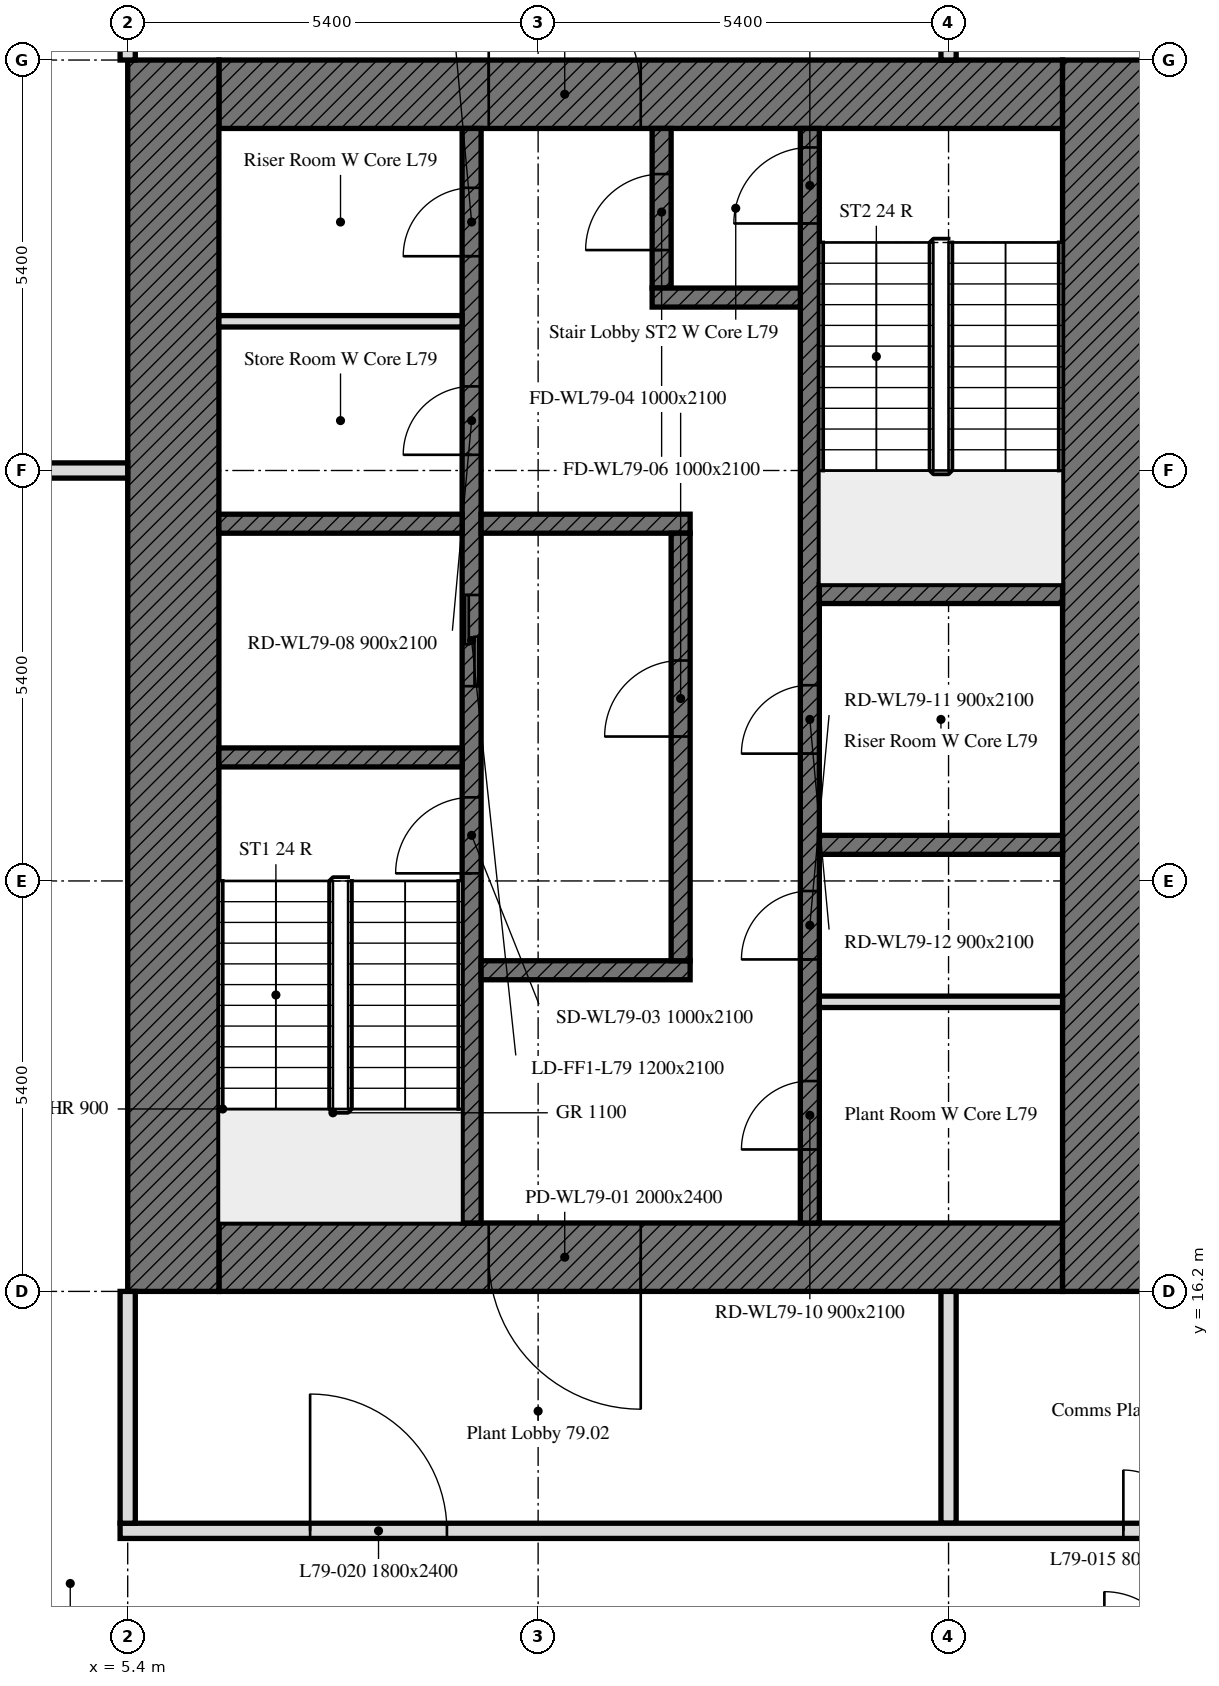
"""IFC4 building model, lengths in metres.
Left out: names, types, materials, properties, quantities, classifications, styles, units other than length and angle.
Written with IfcOpenShell. Run it as: python <this file> out.ifc"""

import sys

from ifc_helpers import new_model, si_unit, direction, frame, frame_2d, origin, place, context, subcontext, project, spatial, rectangle, extrude, element, fill, save


model = new_model("IFC4")
c1 = context("Model", 3, precision=1e-05, world=origin(), true_north=direction((0.0, 1.0)))
c2 = subcontext(c1, "Body", "Model", "MODEL_VIEW")
j1 = project(units=[si_unit("LENGTHUNIT", "METRE"), si_unit("PLANEANGLEUNIT", "RADIAN")], contexts=[c1])
p1 = place(None, origin())
s1 = spatial("IfcSite", under=j1, at=p1, CompositionType="ELEMENT")
p2 = place(p1, origin())
s2 = spatial("IfcBuilding", under=s1, at=p2, CompositionType="ELEMENT")
p3 = place(p2, frame((0.0, 0.0, 317.2)))
s3 = spatial("IfcBuildingStorey", under=s2, at=p3, CompositionType="ELEMENT", Elevation=317.2)
p4 = place(p3, frame((17.7, 16.65, 0.0), z_axis=(0.0, 0.0, 1.0), x_axis=(-1.0, 0.0, 0.0)))
e1 = element("IfcWall", 1, at=p4, inside=s3, PredefinedType="SOLIDWALL", context=c2, shape_type="SweptSolid", body=[
    extrude(rectangle(XDim=11.1, YDim=0.9, at=frame_2d((5.55, 0.0))), origin(), (0.0, 0.0, 1.0), 4.2),
])
p5 = place(p4, frame((5.55, 0.0, 0.0)))
e2 = element("IfcOpeningElement", 2, at=p5, cuts=e1, PredefinedType="OPENING", context=c2, shape_type="SweptSolid", body=[
    extrude(rectangle(XDim=2.0, YDim=2.4, at=frame_2d((1.0, 1.2))), frame((0.0, 0.45, 0.0), z_axis=(0.0, -1.0, 0.0), x_axis=(1.0, 0.0, 0.0)), (0.0, 0.0, 1.0), 0.9),
])
p6 = place(p3, frame((6.6, 31.95, 0.0), z_axis=(0.0, 0.0, 1.0), x_axis=(1.0, 0.0, 0.0)))
e3 = element("IfcWall", 3, at=p6, inside=s3, PredefinedType="SOLIDWALL", context=c2, shape_type="SweptSolid", body=[
    extrude(rectangle(XDim=11.1, YDim=0.9, at=frame_2d((5.55, 0.0))), origin(), (0.0, 0.0, 1.0), 4.2),
])
p7 = place(p6, frame((3.55, 0.0, 0.0)))
e4 = element("IfcOpeningElement", 4, at=p7, cuts=e3, PredefinedType="OPENING", context=c2, shape_type="SweptSolid", body=[
    extrude(rectangle(XDim=2.0, YDim=2.4, at=frame_2d((1.0, 1.2))), frame((0.0, 0.45, 0.0), z_axis=(0.0, -1.0, 0.0), x_axis=(1.0, 0.0, 0.0)), (0.0, 0.0, 1.0), 0.9),
])
for number, where, z_axis, x_axis in (
    (5, (6.0, 16.2, 0.0), (0.0, 0.0, 1.0), (0.0, 1.0, 0.0)),
    (6, (18.3, 32.4, 0.0), (0.0, 0.0, 1.0), (0.0, -1.0, 0.0)),
):
    element("IfcWall", number, at=place(p3, frame(where, z_axis=z_axis, x_axis=x_axis)), inside=s3, PredefinedType="SOLIDWALL", context=c2, shape_type="SweptSolid", body=[
        extrude(rectangle(XDim=16.2, YDim=1.2, at=frame_2d((8.1, 0.0))), origin(), (0.0, 0.0, 1.0), 4.2),
    ])
p8 = place(p3, frame((9.925, 17.1, 0.0), z_axis=(0.0, 0.0, 1.0), x_axis=(0.0, 1.0, 0.0)))
e7 = element("IfcWall", 7, at=p8, inside=s3, PredefinedType="SOLIDWALL", context=c2, shape_type="SweptSolid", body=[
    extrude(rectangle(XDim=14.4, YDim=0.25, at=frame_2d((7.2, 0.0))), origin(), (0.0, 0.0, 1.0), 4.2),
])
p9 = place(p8, frame((4.6, 0.0, 0.0)))
e8 = element("IfcOpeningElement", 8, at=p9, cuts=e7, PredefinedType="OPENING", context=c2, shape_type="SweptSolid", body=[
    extrude(rectangle(XDim=1.0, YDim=2.1, at=frame_2d((0.5, 1.05))), frame((0.0, 0.125, 0.0), z_axis=(0.0, -1.0, 0.0), x_axis=(1.0, 0.0, 0.0)), (0.0, 0.0, 1.0), 0.25),
])
p10 = place(p8, frame((7.062, 0.0, 0.0)))
e9 = element("IfcOpeningElement", 9, at=p10, cuts=e7, PredefinedType="OPENING", context=c2, shape_type="SweptSolid", body=[
    extrude(rectangle(XDim=1.2, YDim=2.1, at=frame_2d((0.6, 1.05))), frame((0.0, 0.125, 0.0), z_axis=(0.0, -1.0, 0.0), x_axis=(1.0, 0.0, 0.0)), (0.0, 0.0, 1.0), 0.25),
])
p11 = place(p8, frame((10.106, 0.0, 0.0)))
e10 = element("IfcOpeningElement", 10, at=p11, cuts=e7, PredefinedType="OPENING", context=c2, shape_type="SweptSolid", body=[
    extrude(rectangle(XDim=0.9, YDim=2.1, at=frame_2d((0.45, 1.05))), frame((0.0, 0.125, 0.0), z_axis=(0.0, -1.0, 0.0), x_axis=(1.0, 0.0, 0.0)), (0.0, 0.0, 1.0), 0.25),
])
p12 = place(p8, frame((12.719, 0.0, 0.0)))
e11 = element("IfcOpeningElement", 11, at=p12, cuts=e7, PredefinedType="OPENING", context=c2, shape_type="SweptSolid", body=[
    extrude(rectangle(XDim=0.9, YDim=2.1, at=frame_2d((0.45, 1.05))), frame((0.0, 0.125, 0.0), z_axis=(0.0, -1.0, 0.0), x_axis=(1.0, 0.0, 0.0)), (0.0, 0.0, 1.0), 0.25),
])
p13 = place(p3, frame((14.375, 17.1, 0.0), z_axis=(0.0, 0.0, 1.0), x_axis=(0.0, 1.0, 0.0)))
e12 = element("IfcWall", 12, at=p13, inside=s3, PredefinedType="SOLIDWALL", context=c2, shape_type="SweptSolid", body=[
    extrude(rectangle(XDim=14.4, YDim=0.25, at=frame_2d((7.2, 0.0))), origin(), (0.0, 0.0, 1.0), 4.2),
])
p14 = place(p13, frame((13.15, 0.0, 0.0)))
e13 = element("IfcOpeningElement", 13, at=p14, cuts=e12, PredefinedType="OPENING", context=c2, shape_type="SweptSolid", body=[
    extrude(rectangle(XDim=1.0, YDim=2.1, at=frame_2d((0.5, 1.05))), frame((0.0, 0.125, 0.0), z_axis=(0.0, -1.0, 0.0), x_axis=(1.0, 0.0, 0.0)), (0.0, 0.0, 1.0), 0.25),
])
p15 = place(p13, frame((0.968, 0.0, 0.0)))
e14 = element("IfcOpeningElement", 14, at=p15, cuts=e12, PredefinedType="OPENING", context=c2, shape_type="SweptSolid", body=[
    extrude(rectangle(XDim=0.9, YDim=2.1, at=frame_2d((0.45, 1.05))), frame((0.0, 0.125, 0.0), z_axis=(0.0, -1.0, 0.0), x_axis=(1.0, 0.0, 0.0)), (0.0, 0.0, 1.0), 0.25),
])
p16 = place(p13, frame((3.468, 0.0, 0.0)))
e15 = element("IfcOpeningElement", 15, at=p16, cuts=e12, PredefinedType="OPENING", context=c2, shape_type="SweptSolid", body=[
    extrude(rectangle(XDim=0.9, YDim=2.1, at=frame_2d((0.45, 1.05))), frame((0.0, 0.125, 0.0), z_axis=(0.0, -1.0, 0.0), x_axis=(1.0, 0.0, 0.0)), (0.0, 0.0, 1.0), 0.25),
])
p17 = place(p13, frame((6.175, 0.0, 0.0)))
e16 = element("IfcOpeningElement", 16, at=p17, cuts=e12, PredefinedType="OPENING", context=c2, shape_type="SweptSolid", body=[
    extrude(rectangle(XDim=0.9, YDim=2.1, at=frame_2d((0.45, 1.05))), frame((0.0, 0.125, 0.0), z_axis=(0.0, -1.0, 0.0), x_axis=(1.0, 0.0, 0.0)), (0.0, 0.0, 1.0), 0.25),
])
for number, where, z_axis, x_axis in (
    (17, (6.6, 23.225, 0.0), (0.0, 0.0, 1.0), (1.0, 0.0, 0.0)),
    (18, (14.5, 25.375, 0.0), (0.0, 0.0, 1.0), (1.0, 0.0, 0.0)),
    (19, (14.5, 22.075, 0.0), (0.0, 0.0, 1.0), (1.0, 0.0, 0.0)),
    (20, (6.6, 26.3, 0.0), (0.0, 0.0, 1.0), (1.0, 0.0, 0.0)),
):
    element("IfcWall", number, at=place(p3, frame(where, z_axis=z_axis, x_axis=x_axis)), inside=s3, PredefinedType="SOLIDWALL", context=c2, shape_type="SweptSolid", body=[
        extrude(rectangle(XDim=3.2, YDim=0.25, at=frame_2d((1.6, 0.0))), origin(), (0.0, 0.0, 1.0), 4.2),
    ])
for number, where, z_axis, x_axis in (
    (21, (10.05, 26.3, 0.0), (0.0, 0.0, 1.0), (1.0, 0.0, 0.0)),
    (22, (10.05, 20.425, 0.0), (0.0, 0.0, 1.0), (1.0, 0.0, 0.0)),
):
    element("IfcWall", number, at=place(p3, frame(where, z_axis=z_axis, x_axis=x_axis)), inside=s3, PredefinedType="SOLIDWALL", context=c2, shape_type="SweptSolid", body=[
        extrude(rectangle(XDim=2.75, YDim=0.25, at=frame_2d((1.375, 0.0))), origin(), (0.0, 0.0, 1.0), 4.2),
    ])
p18 = place(p3, frame((12.425, 29.4, 0.0), z_axis=(0.0, 0.0, 1.0), x_axis=(0.0, 1.0, 0.0)))
e23 = element("IfcWall", 23, at=p18, inside=s3, PredefinedType="SOLIDWALL", context=c2, shape_type="SweptSolid", body=[
    extrude(rectangle(XDim=2.1, YDim=0.25, at=frame_2d((1.05, 0.0))), origin(), (0.0, 0.0, 1.0), 4.2),
])
p19 = place(p18, frame((0.5, 0.0, 0.0)))
e24 = element("IfcOpeningElement", 24, at=p19, cuts=e23, PredefinedType="OPENING", context=c2, shape_type="SweptSolid", body=[
    extrude(rectangle(XDim=1.0, YDim=2.1, at=frame_2d((0.5, 1.05))), frame((0.0, 0.125, 0.0), z_axis=(0.0, -1.0, 0.0), x_axis=(1.0, 0.0, 0.0)), (0.0, 0.0, 1.0), 0.25),
])
p20 = place(p3, frame((12.3, 29.275, 0.0), z_axis=(0.0, 0.0, 1.0), x_axis=(1.0, 0.0, 0.0)))
e25 = element("IfcWall", 25, at=p20, inside=s3, PredefinedType="SOLIDWALL", context=c2, shape_type="SweptSolid", body=[
    extrude(rectangle(XDim=1.95, YDim=0.25, at=frame_2d((0.975, 0.0))), origin(), (0.0, 0.0, 1.0), 4.2),
])
p21 = place(p3, frame((12.675, 20.55, 0.0), z_axis=(0.0, 0.0, 1.0), x_axis=(0.0, 1.0, 0.0)))
e26 = element("IfcWall", 26, at=p21, inside=s3, PredefinedType="SOLIDWALL", context=c2, shape_type="SweptSolid", body=[
    extrude(rectangle(XDim=5.625, YDim=0.25, at=frame_2d((2.812, 0.0))), origin(), (0.0, 0.0, 1.0), 4.2),
])
p22 = place(p21, frame((2.95, 0.0, 0.0)))
e27 = element("IfcOpeningElement", 27, at=p22, cuts=e26, PredefinedType="OPENING", context=c2, shape_type="SweptSolid", body=[
    extrude(rectangle(XDim=1.0, YDim=2.1, at=frame_2d((0.5, 1.05))), frame((0.0, 0.125, 0.0), z_axis=(0.0, -1.0, 0.0), x_axis=(1.0, 0.0, 0.0)), (0.0, 0.0, 1.0), 0.25),
])
for number, where, z_axis, x_axis in (
    (28, (6.6, 28.963, 0.0), (0.0, 0.0, 1.0), (1.0, 0.0, 0.0)),
    (29, (14.5, 20.01, 0.0), (0.0, 0.0, 1.0), (1.0, 0.0, 0.0)),
):
    element("IfcWall", number, at=place(p3, frame(where, z_axis=z_axis, x_axis=x_axis)), inside=s3, PredefinedType="PARTITIONING", context=c2, shape_type="SweptSolid", body=[
        extrude(rectangle(XDim=3.2, YDim=0.15, at=frame_2d((1.6, 0.0))), origin(), (0.0, 0.0, 1.0), 4.2),
    ])
p23 = place(p3, frame((16.2, 37.505, 0.0), z_axis=(0.0, 0.0, 1.0), x_axis=(0.0, -1.0, 0.0)))
e30 = element("IfcWall", 30, at=p23, inside=s3, PredefinedType="PARTITIONING", context=c2, shape_type="SweptSolid", body=[
    extrude(rectangle(XDim=5.105, YDim=0.2, at=frame_2d((2.552, 0.0))), origin(), (0.0, 0.0, 1.0), 3.45),
])
p24 = place(p3, frame((5.4, 37.505, 0.0), z_axis=(0.0, 0.0, 1.0), x_axis=(0.0, -1.0, 0.0)))
e31 = element("IfcWall", 31, at=p24, inside=s3, PredefinedType="PARTITIONING", context=c2, shape_type="SweptSolid", body=[
    extrude(rectangle(XDim=5.105, YDim=0.2, at=frame_2d((2.552, 0.0))), origin(), (0.0, 0.0, 1.0), 4.2),
])
p25 = place(p3, frame((3.7, 27.0, 0.0), z_axis=(0.0, 0.0, 1.0), x_axis=(1.0, 0.0, 0.0)))
e32 = element("IfcWall", 32, at=p25, inside=s3, PredefinedType="PARTITIONING", context=c2, shape_type="SweptSolid", body=[
    extrude(rectangle(XDim=1.7, YDim=0.2, at=frame_2d((0.85, 0.0))), origin(), (0.0, 0.0, 1.0), 3.45),
])
p26 = place(p3, frame((16.2, 16.2, 0.0), z_axis=(0.0, 0.0, 1.0), x_axis=(0.0, -1.0, 0.0)))
e33 = element("IfcWall", 33, at=p26, inside=s3, PredefinedType="PARTITIONING", context=c2, shape_type="SweptSolid", body=[
    extrude(rectangle(XDim=3.05, YDim=0.2, at=frame_2d((1.525, 0.0))), origin(), (0.0, 0.0, 1.0), 4.2),
])
p27 = place(p3, frame((5.3, 13.05, 0.0), z_axis=(0.0, 0.0, 1.0), x_axis=(1.0, 0.0, 0.0)))
e34 = element("IfcWall", 34, at=p27, inside=s3, PredefinedType="PARTITIONING", context=c2, shape_type="SweptSolid", body=[
    extrude(rectangle(XDim=36.049, YDim=0.2, at=frame_2d((18.024, 0.0))), origin(), (0.0, 0.0, 1.0), 4.2),
])
p28 = place(p27, frame((23.9, 0.0, 0.0)))
e35 = element("IfcOpeningElement", 35, at=p28, cuts=e34, PredefinedType="OPENING", context=c2, shape_type="SweptSolid", body=[
    extrude(rectangle(XDim=1.0, YDim=2.1, at=frame_2d((0.5, 1.05))), frame((0.0, 0.1, 0.0), z_axis=(0.0, -1.0, 0.0), x_axis=(1.0, 0.0, 0.0)), (0.0, 0.0, 1.0), 0.2),
])
p29 = place(p27, frame((18.5, 0.0, 0.0)))
e36 = element("IfcOpeningElement", 36, at=p29, cuts=e34, PredefinedType="OPENING", context=c2, shape_type="SweptSolid", body=[
    extrude(rectangle(XDim=1.0, YDim=2.1, at=frame_2d((0.5, 1.05))), frame((0.0, 0.1, 0.0), z_axis=(0.0, -1.0, 0.0), x_axis=(1.0, 0.0, 0.0)), (0.0, 0.0, 1.0), 0.2),
])
p30 = place(p27, frame((13.2, 0.0, 0.0)))
e37 = element("IfcOpeningElement", 37, at=p30, cuts=e34, PredefinedType="OPENING", context=c2, shape_type="SweptSolid", body=[
    extrude(rectangle(XDim=0.8, YDim=2.1, at=frame_2d((0.4, 1.05))), frame((0.0, 0.1, 0.0), z_axis=(0.0, -1.0, 0.0), x_axis=(1.0, 0.0, 0.0)), (0.0, 0.0, 1.0), 0.2),
])
p31 = place(p27, frame((29.5, 0.0, 0.0)))
e38 = element("IfcOpeningElement", 38, at=p31, cuts=e34, PredefinedType="OPENING", context=c2, shape_type="SweptSolid", body=[
    extrude(rectangle(XDim=1.8, YDim=2.4, at=frame_2d((0.9, 1.2))), frame((0.0, 0.1, 0.0), z_axis=(0.0, -1.0, 0.0), x_axis=(1.0, 0.0, 0.0)), (0.0, 0.0, 1.0), 0.2),
])
p32 = place(p27, frame((2.5, 0.0, 0.0)))
e39 = element("IfcOpeningElement", 39, at=p32, cuts=e34, PredefinedType="OPENING", context=c2, shape_type="SweptSolid", body=[
    extrude(rectangle(XDim=1.8, YDim=2.4, at=frame_2d((0.9, 1.2))), frame((0.0, 0.1, 0.0), z_axis=(0.0, -1.0, 0.0), x_axis=(1.0, 0.0, 0.0)), (0.0, 0.0, 1.0), 0.2),
])
p33 = place(p3, frame((5.4, 16.2, 0.0), z_axis=(0.0, 0.0, 1.0), x_axis=(0.0, -1.0, 0.0)))
e40 = element("IfcWall", 40, at=p33, inside=s3, PredefinedType="PARTITIONING", context=c2, shape_type="SweptSolid", body=[
    extrude(rectangle(XDim=3.05, YDim=0.2, at=frame_2d((1.525, 0.0))), origin(), (0.0, 0.0, 1.0), 4.2),
])
p34 = place(p5, origin())
e41 = element("IfcDoor", 41, at=p34, inside=s3, OperationType="DOUBLE_DOOR_SINGLE_SWING", PredefinedType="DOOR", context=c2, shape_type="SweptSolid", body=[
    extrude(rectangle(XDim=2.0, YDim=2.4, at=frame_2d((1.0, 1.2))), frame((0.0, 0.025, 0.0), z_axis=(0.0, -1.0, 0.0), x_axis=(1.0, 0.0, 0.0)), (0.0, 0.0, 1.0), 0.05),
])
fill(e2, e41)
p35 = place(p7, origin())
e42 = element("IfcDoor", 42, at=p35, inside=s3, OperationType="DOUBLE_DOOR_SINGLE_SWING", PredefinedType="DOOR", context=c2, shape_type="SweptSolid", body=[
    extrude(rectangle(XDim=2.0, YDim=2.4, at=frame_2d((1.0, 1.2))), frame((0.0, 0.025, 0.0), z_axis=(0.0, -1.0, 0.0), x_axis=(1.0, 0.0, 0.0)), (0.0, 0.0, 1.0), 0.05),
])
fill(e4, e42)
p36 = place(p9, origin())
e43 = element("IfcDoor", 43, at=p36, inside=s3, OperationType="SINGLE_SWING_LEFT", PredefinedType="DOOR", context=c2, shape_type="SweptSolid", body=[
    extrude(rectangle(XDim=1.0, YDim=2.1, at=frame_2d((0.5, 1.05))), frame((0.0, 0.025, 0.0), z_axis=(0.0, -1.0, 0.0), x_axis=(1.0, 0.0, 0.0)), (0.0, 0.0, 1.0), 0.05),
])
fill(e8, e43)
p37 = place(p22, origin())
e44 = element("IfcDoor", 44, at=p37, inside=s3, OperationType="SINGLE_SWING_LEFT", PredefinedType="DOOR", context=c2, shape_type="SweptSolid", body=[
    extrude(rectangle(XDim=1.0, YDim=2.1, at=frame_2d((0.5, 1.05))), frame((0.0, 0.025, 0.0), z_axis=(0.0, -1.0, 0.0), x_axis=(1.0, 0.0, 0.0)), (0.0, 0.0, 1.0), 0.05),
])
fill(e27, e44)
p38 = place(p14, origin())
e45 = element("IfcDoor", 45, at=p38, inside=s3, OperationType="SINGLE_SWING_LEFT", PredefinedType="DOOR", context=c2, shape_type="SweptSolid", body=[
    extrude(rectangle(XDim=1.0, YDim=2.1, at=frame_2d((0.5, 1.05))), frame((0.0, 0.025, 0.0), z_axis=(0.0, -1.0, 0.0), x_axis=(1.0, 0.0, 0.0)), (0.0, 0.0, 1.0), 0.05),
])
fill(e13, e45)
p39 = place(p19, origin())
e46 = element("IfcDoor", 46, at=p39, inside=s3, OperationType="SINGLE_SWING_LEFT", PredefinedType="DOOR", context=c2, shape_type="SweptSolid", body=[
    extrude(rectangle(XDim=1.0, YDim=2.1, at=frame_2d((0.5, 1.05))), frame((0.0, 0.025, 0.0), z_axis=(0.0, -1.0, 0.0), x_axis=(1.0, 0.0, 0.0)), (0.0, 0.0, 1.0), 0.05),
])
fill(e24, e46)
p40 = place(p10, origin())
e47 = element("IfcDoor", 47, at=p40, inside=s3, OperationType="DOUBLE_DOOR_SLIDING", PredefinedType="DOOR", context=c2, shape_type="SweptSolid", body=[
    extrude(rectangle(XDim=1.2, YDim=2.1, at=frame_2d((0.6, 1.05))), frame((0.0, 0.025, 0.0), z_axis=(0.0, -1.0, 0.0), x_axis=(1.0, 0.0, 0.0)), (0.0, 0.0, 1.0), 0.05),
])
fill(e9, e47)
p41 = place(p11, origin())
e48 = element("IfcDoor", 48, at=p41, inside=s3, OperationType="SINGLE_SWING_LEFT", PredefinedType="DOOR", context=c2, shape_type="SweptSolid", body=[
    extrude(rectangle(XDim=0.9, YDim=2.1, at=frame_2d((0.45, 1.05))), frame((0.0, 0.025, 0.0), z_axis=(0.0, -1.0, 0.0), x_axis=(1.0, 0.0, 0.0)), (0.0, 0.0, 1.0), 0.05),
])
fill(e10, e48)
p42 = place(p12, origin())
e49 = element("IfcDoor", 49, at=p42, inside=s3, OperationType="SINGLE_SWING_LEFT", PredefinedType="DOOR", context=c2, shape_type="SweptSolid", body=[
    extrude(rectangle(XDim=0.9, YDim=2.1, at=frame_2d((0.45, 1.05))), frame((0.0, 0.025, 0.0), z_axis=(0.0, -1.0, 0.0), x_axis=(1.0, 0.0, 0.0)), (0.0, 0.0, 1.0), 0.05),
])
fill(e11, e49)
p43 = place(p15, origin())
e50 = element("IfcDoor", 50, at=p43, inside=s3, OperationType="SINGLE_SWING_LEFT", PredefinedType="DOOR", context=c2, shape_type="SweptSolid", body=[
    extrude(rectangle(XDim=0.9, YDim=2.1, at=frame_2d((0.45, 1.05))), frame((0.0, 0.025, 0.0), z_axis=(0.0, -1.0, 0.0), x_axis=(1.0, 0.0, 0.0)), (0.0, 0.0, 1.0), 0.05),
])
fill(e14, e50)
p44 = place(p16, origin())
e51 = element("IfcDoor", 51, at=p44, inside=s3, OperationType="SINGLE_SWING_LEFT", PredefinedType="DOOR", context=c2, shape_type="SweptSolid", body=[
    extrude(rectangle(XDim=0.9, YDim=2.1, at=frame_2d((0.45, 1.05))), frame((0.0, 0.025, 0.0), z_axis=(0.0, -1.0, 0.0), x_axis=(1.0, 0.0, 0.0)), (0.0, 0.0, 1.0), 0.05),
])
fill(e15, e51)
p45 = place(p17, origin())
e52 = element("IfcDoor", 52, at=p45, inside=s3, OperationType="SINGLE_SWING_LEFT", PredefinedType="DOOR", context=c2, shape_type="SweptSolid", body=[
    extrude(rectangle(XDim=0.9, YDim=2.1, at=frame_2d((0.45, 1.05))), frame((0.0, 0.025, 0.0), z_axis=(0.0, -1.0, 0.0), x_axis=(1.0, 0.0, 0.0)), (0.0, 0.0, 1.0), 0.05),
])
fill(e16, e52)
p46 = place(p30, origin())
e53 = element("IfcDoor", 53, at=p46, inside=s3, OperationType="SINGLE_SWING_LEFT", PredefinedType="DOOR", context=c2, shape_type="SweptSolid", body=[
    extrude(rectangle(XDim=0.8, YDim=2.1, at=frame_2d((0.4, 1.05))), frame((0.0, 0.025, 0.0), z_axis=(0.0, -1.0, 0.0), x_axis=(1.0, 0.0, 0.0)), (0.0, 0.0, 1.0), 0.05),
])
fill(e37, e53)
p47 = place(p32, origin())
e54 = element("IfcDoor", 54, at=p47, inside=s3, OperationType="DOUBLE_DOOR_SINGLE_SWING", PredefinedType="DOOR", context=c2, shape_type="SweptSolid", body=[
    extrude(rectangle(XDim=1.8, YDim=2.4, at=frame_2d((0.9, 1.2))), frame((0.0, 0.025, 0.0), z_axis=(0.0, -1.0, 0.0), x_axis=(1.0, 0.0, 0.0)), (0.0, 0.0, 1.0), 0.05),
])
fill(e39, e54)
save(model, sys.argv[1])
